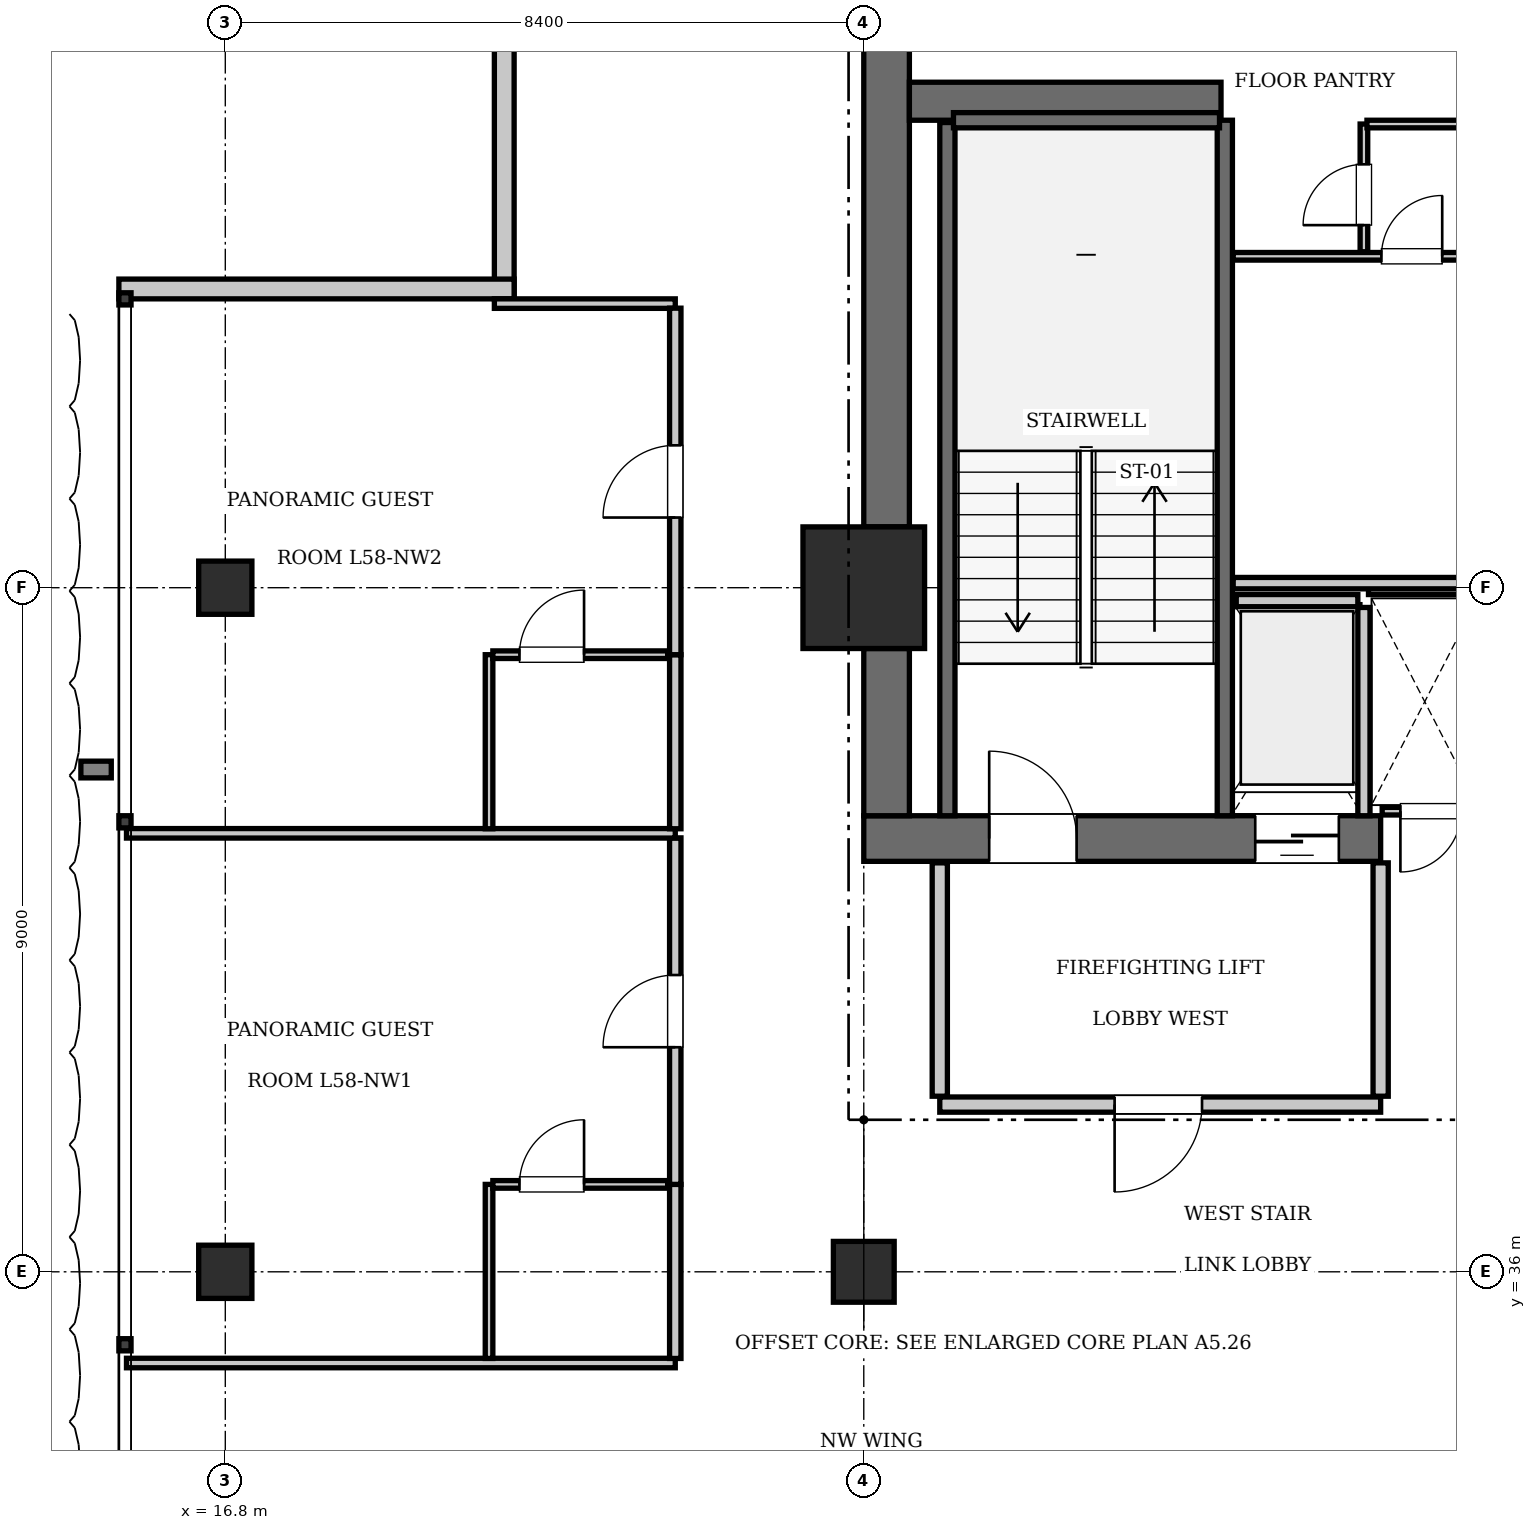
"""IFC4 building model, lengths in metres.
Left out: names, types, materials, properties, quantities, classifications, styles, units other than length and angle.
Written with IfcOpenShell. Run it as: python <this file> out.ifc"""

import sys

from ifc_helpers import new_model, si_unit, direction, frame, frame_2d, origin, origin_2d, place, context, subcontext, project, spatial, rectangle, extrude, element, fill, save


model = new_model("IFC4")
c1 = context("Model", 3, precision=1e-05, world=origin(), true_north=direction((0.0, 1.0)))
c2 = subcontext(c1, "Body", "Model", "MODEL_VIEW")
j1 = project(units=[si_unit("LENGTHUNIT", "METRE"), si_unit("PLANEANGLEUNIT", "RADIAN")], contexts=[c1])
p1 = place(None, origin())
s1 = spatial("IfcSite", under=j1, at=p1, CompositionType="ELEMENT")
p2 = place(p1, origin())
s2 = spatial("IfcBuilding", under=s1, at=p2, CompositionType="ELEMENT")
p3 = place(p2, frame((0.0, 0.0, 239.4)))
s3 = spatial("IfcBuildingStorey", under=s2, at=p3, CompositionType="ELEMENT", Elevation=239.4)
p4 = place(p3, frame((25.2, 45.0, 0.0), z_axis=(0.0, 0.0, 1.0), x_axis=(1.0, 0.0, 0.0)))
e1 = element("IfcColumn", 1, at=p4, inside=s3, PredefinedType="COLUMN", context=c2, shape_type="SweptSolid", body=[
    extrude(rectangle(XDim=1.6, YDim=1.6, at=origin_2d()), origin(), (0.0, 0.0, 1.0), 3.85),
])
p5 = place(p3, frame((25.2, 41.7, 0.0), z_axis=(0.0, 0.0, 1.0), x_axis=(1.0, 0.0, 0.0)))
e2 = element("IfcWall", 2, at=p5, inside=s3, PredefinedType="SHEAR", context=c2, shape_type="SweptSolid", body=[
    extrude(rectangle(XDim=6.8, YDim=0.6, at=frame_2d((3.4, 0.0))), origin(), (0.0, 0.0, 1.0), 3.85),
])
p6 = place(p5, frame((1.65, 0.0, 0.0)))
e3 = element("IfcOpeningElement", 3, at=p6, cuts=e2, PredefinedType="OPENING", context=c2, shape_type="SweptSolid", body=[
    extrude(rectangle(XDim=1.15, YDim=2.15, at=frame_2d((0.575, 1.075))), frame((0.0, 0.31, 0.0), z_axis=(0.0, -1.0, 0.0), x_axis=(1.0, 0.0, 0.0)), (0.0, 0.0, 1.0), 0.62),
])
p7 = place(p5, frame((5.15, 0.0, 0.0)))
e4 = element("IfcOpeningElement", 4, at=p7, cuts=e2, PredefinedType="OPENING", context=c2, shape_type="SweptSolid", body=[
    extrude(rectangle(XDim=1.1, YDim=2.2, at=frame_2d((0.55, 1.1))), frame((0.0, 0.31, 0.0), z_axis=(0.0, -1.0, 0.0), x_axis=(1.0, 0.0, 0.0)), (0.0, 0.0, 1.0), 0.62),
])
p8 = place(p3, frame((25.5, 42.0, 0.0), z_axis=(0.0, 0.0, 1.0), x_axis=(0.0, 1.0, 0.0)))
e5 = element("IfcWall", 5, at=p8, inside=s3, PredefinedType="SHEAR", context=c2, shape_type="SweptSolid", body=[
    extrude(rectangle(XDim=2.2, YDim=0.6, at=frame_2d((1.1, 0.0))), origin(), (0.0, 0.0, 1.0), 3.85),
])
p9 = place(p3, frame((25.5, 45.8, 0.0), z_axis=(0.0, 0.0, 1.0), x_axis=(0.0, 1.0, 0.0)))
e6 = element("IfcWall", 6, at=p9, inside=s3, PredefinedType="SHEAR", context=c2, shape_type="SweptSolid", body=[
    extrude(rectangle(XDim=7.6, YDim=0.6, at=frame_2d((3.8, 0.0))), origin(), (0.0, 0.0, 1.0), 3.85),
])
p10 = place(p3, frame((25.8, 51.4, 0.0), z_axis=(0.0, 0.0, 1.0), x_axis=(1.0, 0.0, 0.0)))
e7 = element("IfcWall", 7, at=p10, inside=s3, PredefinedType="SHEAR", context=c2, shape_type="SweptSolid", body=[
    extrude(rectangle(XDim=4.1, YDim=0.5, at=frame_2d((2.05, 0.0))), origin(), (0.0, 0.0, 1.0), 3.85),
])
p11 = place(p3, frame((25.2, 36.0, 0.0), z_axis=(0.0, 0.0, 1.0), x_axis=(1.0, 0.0, 0.0)))
e8 = element("IfcColumn", 8, at=p11, inside=s3, PredefinedType="COLUMN", context=c2, shape_type="SweptSolid", body=[
    extrude(rectangle(XDim=0.8, YDim=0.8, at=origin_2d()), origin(), (0.0, 0.0, 1.0), 3.85),
])
for number, where, z_axis, x_axis in (
    (9, (16.8, 36.0, 0.0), (0.0, 0.0, 1.0), (1.0, 0.0, 0.0)),
    (10, (16.8, 45.0, 0.0), (0.0, 0.0, 1.0), (1.0, 0.0, 0.0)),
):
    element("IfcColumn", number, at=place(p3, frame(where, z_axis=z_axis, x_axis=x_axis)), inside=s3, PredefinedType="COLUMN", context=c2, shape_type="SweptSolid", body=[
        extrude(rectangle(XDim=0.7, YDim=0.7, at=origin_2d()), origin(), (0.0, 0.0, 1.0), 3.85),
    ])
p12 = place(p3, frame((29.95, 42.0, 0.0), z_axis=(0.0, 0.0, 1.0), x_axis=(0.0, 1.0, 0.0)))
e11 = element("IfcWall", 11, at=p12, inside=s3, PredefinedType="SOLIDWALL", context=c2, shape_type="SweptSolid", body=[
    extrude(rectangle(XDim=9.15, YDim=0.2, at=frame_2d((4.575, 0.0))), origin(), (0.0, 0.0, 1.0), 3.61),
])
p13 = place(p3, frame((26.3, 42.0, 0.0), z_axis=(0.0, 0.0, 1.0), x_axis=(0.0, 1.0, 0.0)))
e12 = element("IfcWall", 12, at=p13, inside=s3, PredefinedType="SOLIDWALL", context=c2, shape_type="SweptSolid", body=[
    extrude(rectangle(XDim=9.12, YDim=0.2, at=frame_2d((4.56, 0.0))), origin(), (0.0, 0.0, 1.0), 3.61),
])
p14 = place(p3, frame((26.38, 51.15, 0.0), z_axis=(0.0, 0.0, 1.0), x_axis=(1.0, 0.0, 0.0)))
e13 = element("IfcWall", 13, at=p14, inside=s3, PredefinedType="SOLIDWALL", context=c2, shape_type="SweptSolid", body=[
    extrude(rectangle(XDim=3.5, YDim=0.2, at=frame_2d((1.75, 0.0))), origin(), (0.0, 0.0, 1.0), 3.61),
])
p15 = place(p3, frame((30.1, 44.83, 0.0), z_axis=(0.0, 0.0, 1.0), x_axis=(1.0, 0.0, 0.0)))
e14 = element("IfcWall", 14, at=p15, inside=s3, PredefinedType="SOLIDWALL", context=c2, shape_type="SweptSolid", body=[
    extrude(rectangle(XDim=1.6, YDim=0.16, at=frame_2d((0.8, 0.0))), origin(), (0.0, 0.0, 1.0), 3.61),
])
p16 = place(p3, frame((31.78, 42.0, 0.0), z_axis=(0.0, 0.0, 1.0), x_axis=(0.0, 1.0, 0.0)))
e15 = element("IfcWall", 15, at=p16, inside=s3, PredefinedType="SOLIDWALL", context=c2, shape_type="SweptSolid", body=[
    extrude(rectangle(XDim=2.74, YDim=0.16, at=frame_2d((1.37, 0.0))), origin(), (0.0, 0.0, 1.0), 3.61),
])
p17 = place(p3, frame((20.47, 48.8, 0.0), z_axis=(0.0, 0.0, 1.0), x_axis=(0.0, 1.0, 0.0)))
e16 = element("IfcWall", 16, at=p17, inside=s3, PredefinedType="SOLIDWALL", context=c2, shape_type="SweptSolid", body=[
    extrude(rectangle(XDim=5.2, YDim=0.26, at=frame_2d((2.6, 0.0))), origin(), (0.0, 0.0, 1.0), 3.61),
])
p18 = place(p3, frame((15.4, 48.93, 0.0), z_axis=(0.0, 0.0, 1.0), x_axis=(1.0, 0.0, 0.0)))
e17 = element("IfcWall", 17, at=p18, inside=s3, PredefinedType="SOLIDWALL", context=c2, shape_type="SweptSolid", body=[
    extrude(rectangle(XDim=5.2, YDim=0.26, at=frame_2d((2.6, 0.0))), origin(), (0.0, 0.0, 1.0), 3.61),
])
p19 = place(p3, frame((26.2, 38.2, 0.0), z_axis=(0.0, 0.0, 1.0), x_axis=(1.0, 0.0, 0.0)))
e18 = element("IfcWall", 18, at=p19, inside=s3, PredefinedType="PARTITIONING", context=c2, shape_type="SweptSolid", body=[
    extrude(rectangle(XDim=5.8, YDim=0.2, at=frame_2d((2.9, 0.0))), origin(), (0.0, 0.0, 1.0), 3.61),
])
p20 = place(p19, frame((2.3, 0.0, 0.0)))
e19 = element("IfcOpeningElement", 19, at=p20, cuts=e18, PredefinedType="OPENING", context=c2, shape_type="SweptSolid", body=[
    extrude(rectangle(XDim=1.15, YDim=2.15, at=frame_2d((0.575, 1.075))), frame((0.0, 0.11, 0.0), z_axis=(0.0, -1.0, 0.0), x_axis=(1.0, 0.0, 0.0)), (0.0, 0.0, 1.0), 0.22),
])
for number, where, z_axis, x_axis in (
    (20, (26.2, 38.31, 0.0), (0.0, 0.0, 1.0), (0.0, 1.0, 0.0)),
    (21, (32.0, 38.31, 0.0), (0.0, 0.0, 1.0), (0.0, 1.0, 0.0)),
):
    element("IfcWall", number, at=place(p3, frame(where, z_axis=z_axis, x_axis=x_axis)), inside=s3, PredefinedType="PARTITIONING", context=c2, shape_type="SweptSolid", body=[
        extrude(rectangle(XDim=3.07, YDim=0.2, at=frame_2d((1.535, 0.0))), origin(), (0.0, 0.0, 1.0), 3.61),
    ])
p21 = place(p3, frame((32.02, 42.06, 0.0), z_axis=(0.0, 0.0, 1.0), x_axis=(1.0, 0.0, 0.0)))
e22 = element("IfcWall", 22, at=p21, inside=s3, PredefinedType="PARTITIONING", context=c2, shape_type="SweptSolid", body=[
    extrude(rectangle(XDim=1.32, YDim=0.1, at=frame_2d((0.66, 0.0))), origin(), (0.0, 0.0, 1.0), 3.61),
])
p22 = place(p21, frame((0.24, 0.0, 0.0)))
e23 = element("IfcOpeningElement", 23, at=p22, cuts=e22, PredefinedType="OPENING", context=c2, shape_type="SweptSolid", body=[
    extrude(rectangle(XDim=0.8, YDim=2.05, at=frame_2d((0.4, 1.025))), frame((0.0, 0.06, 0.0), z_axis=(0.0, -1.0, 0.0), x_axis=(1.0, 0.0, 0.0)), (0.0, 0.0, 1.0), 0.12),
])
p23 = place(p3, frame((31.84, 44.96, 0.0), z_axis=(0.0, 0.0, 1.0), x_axis=(1.0, 0.0, 0.0)))
e24 = element("IfcWall", 24, at=p23, inside=s3, PredefinedType="PARTITIONING", context=c2, shape_type="SweptSolid", body=[
    extrude(rectangle(XDim=1.48, YDim=0.1, at=frame_2d((0.74, 0.0))), origin(), (0.0, 0.0, 1.0), 3.61),
])
p24 = place(p3, frame((30.06, 45.06, 0.0), z_axis=(0.0, 0.0, 1.0), x_axis=(1.0, 0.0, 0.0)))
e25 = element("IfcWall", 25, at=p24, inside=s3, PredefinedType="PARTITIONING", context=c2, shape_type="SweptSolid", body=[
    extrude(rectangle(XDim=3.18, YDim=0.15, at=frame_2d((1.59, 0.0))), origin(), (0.0, 0.0, 1.0), 3.61),
])
p25 = place(p3, frame((30.06, 49.36, 0.0), z_axis=(0.0, 0.0, 1.0), x_axis=(1.0, 0.0, 0.0)))
e26 = element("IfcWall", 26, at=p25, inside=s3, PredefinedType="PARTITIONING", context=c2, shape_type="SweptSolid", body=[
    extrude(rectangle(XDim=3.18, YDim=0.1, at=frame_2d((1.59, 0.0))), origin(), (0.0, 0.0, 1.0), 3.61),
])
p26 = place(p25, frame((1.95, 0.0, 0.0)))
e27 = element("IfcOpeningElement", 27, at=p26, cuts=e26, PredefinedType="OPENING", context=c2, shape_type="SweptSolid", body=[
    extrude(rectangle(XDim=0.8, YDim=2.05, at=frame_2d((0.4, 1.025))), frame((0.0, 0.06, 0.0), z_axis=(0.0, -1.0, 0.0), x_axis=(1.0, 0.0, 0.0)), (0.0, 0.0, 1.0), 0.12),
])
p27 = place(p3, frame((31.78, 49.42, 0.0), z_axis=(0.0, 0.0, 1.0), x_axis=(0.0, 1.0, 0.0)))
e28 = element("IfcWall", 28, at=p27, inside=s3, PredefinedType="PARTITIONING", context=c2, shape_type="SweptSolid", body=[
    extrude(rectangle(XDim=1.68, YDim=0.1, at=frame_2d((0.84, 0.0))), origin(), (0.0, 0.0, 1.0), 3.61),
])
p28 = place(p27, frame((0.35, 0.0, 0.0)))
e29 = element("IfcOpeningElement", 29, at=p28, cuts=e28, PredefinedType="OPENING", context=c2, shape_type="SweptSolid", body=[
    extrude(rectangle(XDim=0.8, YDim=2.05, at=frame_2d((0.4, 1.025))), frame((0.0, 0.06, 0.0), z_axis=(0.0, -1.0, 0.0), x_axis=(1.0, 0.0, 0.0)), (0.0, 0.0, 1.0), 0.12),
])
p29 = place(p3, frame((31.82, 51.1, 0.0), z_axis=(0.0, 0.0, 1.0), x_axis=(1.0, 0.0, 0.0)))
e30 = element("IfcWall", 30, at=p29, inside=s3, PredefinedType="PARTITIONING", context=c2, shape_type="SweptSolid", body=[
    extrude(rectangle(XDim=1.42, YDim=0.1, at=frame_2d((0.71, 0.0))), origin(), (0.0, 0.0, 1.0), 3.61),
])
p30 = place(p3, frame((15.5, 34.8, 0.0), z_axis=(0.0, 0.0, 1.0), x_axis=(1.0, 0.0, 0.0)))
e31 = element("IfcWall", 31, at=p30, inside=s3, PredefinedType="PARTITIONING", context=c2, shape_type="SweptSolid", body=[
    extrude(rectangle(XDim=7.22, YDim=0.125, at=frame_2d((3.61, 0.0))), origin(), (0.0, 0.0, 1.0), 3.61),
])
p31 = place(p3, frame((20.34, 48.738, 0.0), z_axis=(0.0, 0.0, 1.0), x_axis=(1.0, 0.0, 0.0)))
e32 = element("IfcWall", 32, at=p31, inside=s3, PredefinedType="PARTITIONING", context=c2, shape_type="SweptSolid", body=[
    extrude(rectangle(XDim=2.38, YDim=0.125, at=frame_2d((1.19, 0.0))), origin(), (0.0, 0.0, 1.0), 3.61),
])
p32 = place(p3, frame((22.72, 34.86, 0.0), z_axis=(0.0, 0.0, 1.0), x_axis=(0.0, 1.0, 0.0)))
e33 = element("IfcWall", 33, at=p32, inside=s3, PredefinedType="PARTITIONING", context=c2, shape_type="SweptSolid", body=[
    extrude(rectangle(XDim=2.29, YDim=0.15, at=frame_2d((1.145, 0.0))), origin(), (0.0, 0.0, 1.0), 3.61),
])
p33 = place(p3, frame((22.72, 37.15, 0.0), z_axis=(0.0, 0.0, 1.0), x_axis=(0.0, 1.0, 0.0)))
e34 = element("IfcWall", 34, at=p33, inside=s3, PredefinedType="PARTITIONING", context=c2, shape_type="SweptSolid", body=[
    extrude(rectangle(XDim=4.559, YDim=0.15, at=frame_2d((2.279, 0.0))), origin(), (0.0, 0.0, 1.0), 3.61),
])
p34 = place(p33, frame((1.804, 0.0, 0.0)))
e35 = element("IfcOpeningElement", 35, at=p34, cuts=e34, PredefinedType="OPENING", context=c2, shape_type="SweptSolid", body=[
    extrude(rectangle(XDim=0.95, YDim=2.15, at=frame_2d((0.475, 1.075))), frame((0.0, 0.085, 0.0), z_axis=(0.0, -1.0, 0.0), x_axis=(1.0, 0.0, 0.0)), (0.0, 0.0, 1.0), 0.17),
])
p35 = place(p3, frame((20.27, 34.86, 0.0), z_axis=(0.0, 0.0, 1.0), x_axis=(0.0, 1.0, 0.0)))
e36 = element("IfcWall", 36, at=p35, inside=s3, PredefinedType="PARTITIONING", context=c2, shape_type="SweptSolid", body=[
    extrude(rectangle(XDim=2.29, YDim=0.1, at=frame_2d((1.145, 0.0))), origin(), (0.0, 0.0, 1.0), 3.61),
])
p36 = place(p3, frame((20.32, 37.15, 0.0), z_axis=(0.0, 0.0, 1.0), x_axis=(1.0, 0.0, 0.0)))
e37 = element("IfcWall", 37, at=p36, inside=s3, PredefinedType="PARTITIONING", context=c2, shape_type="SweptSolid", body=[
    extrude(rectangle(XDim=2.3, YDim=0.1, at=frame_2d((1.15, 0.0))), origin(), (0.0, 0.0, 1.0), 3.61),
])
p37 = place(p36, frame((0.35, 0.0, 0.0)))
e38 = element("IfcOpeningElement", 38, at=p37, cuts=e37, PredefinedType="OPENING", context=c2, shape_type="SweptSolid", body=[
    extrude(rectangle(XDim=0.85, YDim=2.1, at=frame_2d((0.425, 1.05))), frame((0.0, 0.06, 0.0), z_axis=(0.0, -1.0, 0.0), x_axis=(1.0, 0.0, 0.0)), (0.0, 0.0, 1.0), 0.12),
])
p38 = place(p3, frame((15.5, 41.769, 0.0), z_axis=(0.0, 0.0, 1.0), x_axis=(1.0, 0.0, 0.0)))
e39 = element("IfcWall", 39, at=p38, inside=s3, PredefinedType="PARTITIONING", context=c2, shape_type="SweptSolid", body=[
    extrude(rectangle(XDim=7.22, YDim=0.125, at=frame_2d((3.61, 0.0))), origin(), (0.0, 0.0, 1.0), 3.61),
])
p39 = place(p3, frame((22.72, 41.829, 0.0), z_axis=(0.0, 0.0, 1.0), x_axis=(0.0, 1.0, 0.0)))
e40 = element("IfcWall", 40, at=p39, inside=s3, PredefinedType="PARTITIONING", context=c2, shape_type="SweptSolid", body=[
    extrude(rectangle(XDim=2.29, YDim=0.15, at=frame_2d((1.145, 0.0))), origin(), (0.0, 0.0, 1.0), 3.61),
])
p40 = place(p3, frame((22.72, 44.119, 0.0), z_axis=(0.0, 0.0, 1.0), x_axis=(0.0, 1.0, 0.0)))
e41 = element("IfcWall", 41, at=p40, inside=s3, PredefinedType="PARTITIONING", context=c2, shape_type="SweptSolid", body=[
    extrude(rectangle(XDim=4.559, YDim=0.15, at=frame_2d((2.279, 0.0))), origin(), (0.0, 0.0, 1.0), 3.61),
])
p41 = place(p40, frame((1.804, 0.0, 0.0)))
e42 = element("IfcOpeningElement", 42, at=p41, cuts=e41, PredefinedType="OPENING", context=c2, shape_type="SweptSolid", body=[
    extrude(rectangle(XDim=0.95, YDim=2.15, at=frame_2d((0.475, 1.075))), frame((0.0, 0.085, 0.0), z_axis=(0.0, -1.0, 0.0), x_axis=(1.0, 0.0, 0.0)), (0.0, 0.0, 1.0), 0.17),
])
p42 = place(p3, frame((20.27, 41.829, 0.0), z_axis=(0.0, 0.0, 1.0), x_axis=(0.0, 1.0, 0.0)))
e43 = element("IfcWall", 43, at=p42, inside=s3, PredefinedType="PARTITIONING", context=c2, shape_type="SweptSolid", body=[
    extrude(rectangle(XDim=2.29, YDim=0.1, at=frame_2d((1.145, 0.0))), origin(), (0.0, 0.0, 1.0), 3.61),
])
p43 = place(p3, frame((20.32, 44.119, 0.0), z_axis=(0.0, 0.0, 1.0), x_axis=(1.0, 0.0, 0.0)))
e44 = element("IfcWall", 44, at=p43, inside=s3, PredefinedType="PARTITIONING", context=c2, shape_type="SweptSolid", body=[
    extrude(rectangle(XDim=2.3, YDim=0.1, at=frame_2d((1.15, 0.0))), origin(), (0.0, 0.0, 1.0), 3.61),
])
p44 = place(p43, frame((0.35, 0.0, 0.0)))
e45 = element("IfcOpeningElement", 45, at=p44, cuts=e44, PredefinedType="OPENING", context=c2, shape_type="SweptSolid", body=[
    extrude(rectangle(XDim=0.85, YDim=2.1, at=frame_2d((0.425, 1.05))), frame((0.0, 0.06, 0.0), z_axis=(0.0, -1.0, 0.0), x_axis=(1.0, 0.0, 0.0)), (0.0, 0.0, 1.0), 0.12),
])
p45 = place(p6, origin())
e46 = element("IfcDoor", 46, at=p45, inside=s3, OperationType="SINGLE_SWING_LEFT", PredefinedType="DOOR", context=c2, shape_type="SweptSolid", body=[
    extrude(rectangle(XDim=1.15, YDim=2.15, at=frame_2d((0.575, 1.075))), frame((0.0, 0.025, 0.0), z_axis=(0.0, -1.0, 0.0), x_axis=(1.0, 0.0, 0.0)), (0.0, 0.0, 1.0), 0.05),
])
fill(e3, e46)
p46 = place(p7, frame((1.1, 0.0, 0.0), z_axis=(0.0, 0.0, 1.0), x_axis=(-1.0, 0.0, 0.0)))
e47 = element("IfcDoor", 47, at=p46, inside=s3, OperationType="SLIDING_TO_LEFT", PredefinedType="DOOR", context=c2, shape_type="SweptSolid", body=[
    extrude(rectangle(XDim=1.1, YDim=2.2, at=frame_2d((0.55, 1.1))), frame((0.0, 0.025, 0.0), z_axis=(0.0, -1.0, 0.0), x_axis=(1.0, 0.0, 0.0)), (0.0, 0.0, 1.0), 0.05),
])
fill(e4, e47)
p47 = place(p20, frame((1.15, 0.0, 0.0), z_axis=(0.0, 0.0, 1.0), x_axis=(-1.0, 0.0, 0.0)))
e48 = element("IfcDoor", 48, at=p47, inside=s3, OperationType="SINGLE_SWING_RIGHT", PredefinedType="DOOR", context=c2, shape_type="SweptSolid", body=[
    extrude(rectangle(XDim=1.15, YDim=2.15, at=frame_2d((0.575, 1.075))), frame((0.0, 0.025, 0.0), z_axis=(0.0, -1.0, 0.0), x_axis=(1.0, 0.0, 0.0)), (0.0, 0.0, 1.0), 0.05),
])
fill(e19, e48)
p48 = place(p22, frame((0.8, 0.0, 0.0), z_axis=(0.0, 0.0, 1.0), x_axis=(-1.0, 0.0, 0.0)))
e49 = element("IfcDoor", 49, at=p48, inside=s3, OperationType="SINGLE_SWING_RIGHT", PredefinedType="DOOR", context=c2, shape_type="SweptSolid", body=[
    extrude(rectangle(XDim=0.8, YDim=2.05, at=frame_2d((0.4, 1.025))), frame((0.0, 0.025, 0.0), z_axis=(0.0, -1.0, 0.0), x_axis=(1.0, 0.0, 0.0)), (0.0, 0.0, 1.0), 0.05),
])
fill(e23, e49)
p49 = place(p26, origin())
e50 = element("IfcDoor", 50, at=p49, inside=s3, OperationType="SINGLE_SWING_RIGHT", PredefinedType="DOOR", context=c2, shape_type="SweptSolid", body=[
    extrude(rectangle(XDim=0.8, YDim=2.05, at=frame_2d((0.4, 1.025))), frame((0.0, 0.025, 0.0), z_axis=(0.0, -1.0, 0.0), x_axis=(1.0, 0.0, 0.0)), (0.0, 0.0, 1.0), 0.05),
])
fill(e27, e50)
p50 = place(p28, origin())
e51 = element("IfcDoor", 51, at=p50, inside=s3, OperationType="SINGLE_SWING_LEFT", PredefinedType="DOOR", context=c2, shape_type="SweptSolid", body=[
    extrude(rectangle(XDim=0.8, YDim=2.05, at=frame_2d((0.4, 1.025))), frame((0.0, 0.025, 0.0), z_axis=(0.0, -1.0, 0.0), x_axis=(1.0, 0.0, 0.0)), (0.0, 0.0, 1.0), 0.05),
])
fill(e29, e51)
p51 = place(p37, origin())
e52 = element("IfcDoor", 52, at=p51, inside=s3, OperationType="SINGLE_SWING_RIGHT", PredefinedType="DOOR", context=c2, shape_type="SweptSolid", body=[
    extrude(rectangle(XDim=0.85, YDim=2.1, at=frame_2d((0.425, 1.05))), frame((0.0, 0.025, 0.0), z_axis=(0.0, -1.0, 0.0), x_axis=(1.0, 0.0, 0.0)), (0.0, 0.0, 1.0), 0.05),
])
fill(e38, e52)
p52 = place(p34, origin())
e53 = element("IfcDoor", 53, at=p52, inside=s3, OperationType="SINGLE_SWING_LEFT", PredefinedType="DOOR", context=c2, shape_type="SweptSolid", body=[
    extrude(rectangle(XDim=0.95, YDim=2.15, at=frame_2d((0.475, 1.075))), frame((0.0, 0.025, 0.0), z_axis=(0.0, -1.0, 0.0), x_axis=(1.0, 0.0, 0.0)), (0.0, 0.0, 1.0), 0.05),
])
fill(e35, e53)
p53 = place(p44, origin())
e54 = element("IfcDoor", 54, at=p53, inside=s3, OperationType="SINGLE_SWING_RIGHT", PredefinedType="DOOR", context=c2, shape_type="SweptSolid", body=[
    extrude(rectangle(XDim=0.85, YDim=2.1, at=frame_2d((0.425, 1.05))), frame((0.0, 0.025, 0.0), z_axis=(0.0, -1.0, 0.0), x_axis=(1.0, 0.0, 0.0)), (0.0, 0.0, 1.0), 0.05),
])
fill(e45, e54)
p54 = place(p41, origin())
e55 = element("IfcDoor", 55, at=p54, inside=s3, OperationType="SINGLE_SWING_LEFT", PredefinedType="DOOR", context=c2, shape_type="SweptSolid", body=[
    extrude(rectangle(XDim=0.95, YDim=2.15, at=frame_2d((0.475, 1.075))), frame((0.0, 0.025, 0.0), z_axis=(0.0, -1.0, 0.0), x_axis=(1.0, 0.0, 0.0)), (0.0, 0.0, 1.0), 0.05),
])
fill(e42, e55)
save(model, sys.argv[1])
